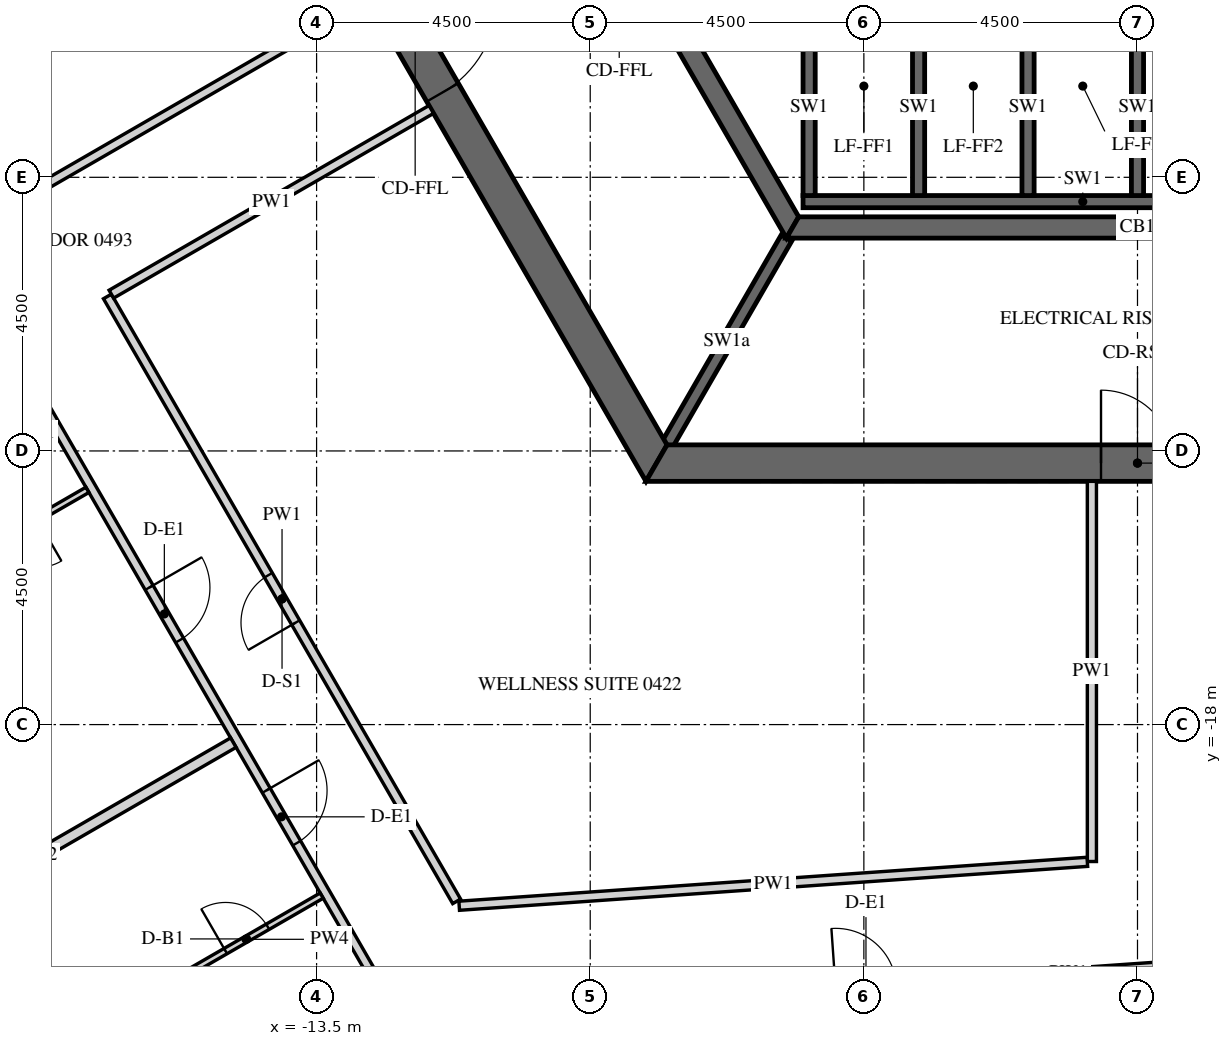
"""IFC4 building model, lengths in metres.
Left out: names, types, materials, properties, quantities, classifications, styles, units other than length and angle.
Written with IfcOpenShell. Run it as: python <this file> out.ifc"""

import sys

from ifc_helpers import new_model, si_unit, direction, frame, frame_2d, origin, place, context, subcontext, project, spatial, polyline, rectangle, outline, extrude, element, fill, save


model = new_model("IFC4")
c1 = context("Model", 3, precision=1e-05, world=origin(), true_north=direction((0.0, 1.0)))
c2 = subcontext(c1, "Body", "Model", "MODEL_VIEW")
j1 = project(units=[si_unit("LENGTHUNIT", "METRE"), si_unit("PLANEANGLEUNIT", "RADIAN")], contexts=[c1])
p1 = place(None, origin())
s1 = spatial("IfcSite", under=j1, at=p1, CompositionType="ELEMENT")
p2 = place(p1, origin())
s2 = spatial("IfcBuilding", under=s1, at=p2, CompositionType="ELEMENT")
p3 = place(p2, frame((0.0, 0.0, 68.7)))
s3 = spatial("IfcBuildingStorey", under=s2, at=p3, CompositionType="ELEMENT", Elevation=68.7)
p4 = place(p3, frame((-32.655, -2.89, -0.15), z_axis=(0.0, 0.0, 1.0), x_axis=(0.499997711317, -0.866026725152, 0.0)))
e1 = element("IfcWall", 1, at=p4, inside=s3, PredefinedType="SOLIDWALL", context=c2, shape_type="SweptSolid", body=[
    extrude(outline(polyline([(-0.022, -0.275), (30.097, -0.275), (30.045, 0.275), (0.022, 0.275), (-0.022, -0.275)])), origin(), (0.0, 0.0, 1.0), 3.9),
])
p5 = place(p4, frame((1.236, 0.0, 1.05)))
e2 = element("IfcOpeningElement", 2, at=p5, cuts=e1, PredefinedType="OPENING", context=c2, shape_type="SweptSolid", body=[
    extrude(rectangle(XDim=2.4, YDim=2.4, at=frame_2d((1.2, 1.2))), frame((0.0, 0.285, 0.0), z_axis=(0.0, -1.0, 0.0), x_axis=(1.0, 0.0, 0.0)), (0.0, 0.0, 1.0), 0.57),
])
p6 = place(p4, frame((4.835, 0.0, 1.05)))
e3 = element("IfcOpeningElement", 3, at=p6, cuts=e1, PredefinedType="OPENING", context=c2, shape_type="SweptSolid", body=[
    extrude(rectangle(XDim=2.4, YDim=2.4, at=frame_2d((1.2, 1.2))), frame((0.0, 0.285, 0.0), z_axis=(0.0, -1.0, 0.0), x_axis=(1.0, 0.0, 0.0)), (0.0, 0.0, 1.0), 0.57),
])
p7 = place(p4, frame((8.436, 0.0, 1.05)))
e4 = element("IfcOpeningElement", 4, at=p7, cuts=e1, PredefinedType="OPENING", context=c2, shape_type="SweptSolid", body=[
    extrude(rectangle(XDim=2.4, YDim=2.4, at=frame_2d((1.2, 1.2))), frame((0.0, 0.285, 0.0), z_axis=(0.0, -1.0, 0.0), x_axis=(1.0, 0.0, 0.0)), (0.0, 0.0, 1.0), 0.57),
])
p8 = place(p4, frame((12.035, 0.0, 1.05)))
e5 = element("IfcOpeningElement", 5, at=p8, cuts=e1, PredefinedType="OPENING", context=c2, shape_type="SweptSolid", body=[
    extrude(rectangle(XDim=2.4, YDim=2.4, at=frame_2d((1.2, 1.2))), frame((0.0, 0.285, 0.0), z_axis=(0.0, -1.0, 0.0), x_axis=(1.0, 0.0, 0.0)), (0.0, 0.0, 1.0), 0.57),
])
p9 = place(p4, frame((15.635, 0.0, 1.05)))
e6 = element("IfcOpeningElement", 6, at=p9, cuts=e1, PredefinedType="OPENING", context=c2, shape_type="SweptSolid", body=[
    extrude(rectangle(XDim=2.4, YDim=2.4, at=frame_2d((1.2, 1.2))), frame((0.0, 0.285, 0.0), z_axis=(0.0, -1.0, 0.0), x_axis=(1.0, 0.0, 0.0)), (0.0, 0.0, 1.0), 0.57),
])
p10 = place(p4, frame((19.236, 0.0, 1.05)))
e7 = element("IfcOpeningElement", 7, at=p10, cuts=e1, PredefinedType="OPENING", context=c2, shape_type="SweptSolid", body=[
    extrude(rectangle(XDim=2.4, YDim=2.4, at=frame_2d((1.2, 1.2))), frame((0.0, 0.285, 0.0), z_axis=(0.0, -1.0, 0.0), x_axis=(1.0, 0.0, 0.0)), (0.0, 0.0, 1.0), 0.57),
])
p11 = place(p4, frame((22.835, 0.0, 1.05)))
e8 = element("IfcOpeningElement", 8, at=p11, cuts=e1, PredefinedType="OPENING", context=c2, shape_type="SweptSolid", body=[
    extrude(rectangle(XDim=2.4, YDim=2.4, at=frame_2d((1.2, 1.2))), frame((0.0, 0.285, 0.0), z_axis=(0.0, -1.0, 0.0), x_axis=(1.0, 0.0, 0.0)), (0.0, 0.0, 1.0), 0.57),
])
p12 = place(p4, frame((26.436, 0.0, 1.05)))
e9 = element("IfcOpeningElement", 9, at=p12, cuts=e1, PredefinedType="OPENING", context=c2, shape_type="SweptSolid", body=[
    extrude(rectangle(XDim=2.4, YDim=2.4, at=frame_2d((1.2, 1.2))), frame((0.0, 0.285, 0.0), z_axis=(0.0, -1.0, 0.0), x_axis=(1.0, 0.0, 0.0)), (0.0, 0.0, 1.0), 0.57),
])
p13 = place(p3, frame((-15.819, 0.0, -0.15), z_axis=(0.0, 0.0, 1.0), x_axis=(0.499999880136, -0.866025472988, 0.0)))
e10 = element("IfcWall", 10, at=p13, inside=s3, PredefinedType="SHEAR", context=c2, shape_type="SweptSolid", body=[
    extrude(outline(polyline([(-0.173, -0.3), (15.993, -0.3), (15.646, 0.3), (0.173, 0.3), (-0.173, -0.3)])), origin(), (0.0, 0.0, 1.0), 3.9),
])
p14 = place(p13, frame((6.981, 0.0, 0.15)))
e11 = element("IfcOpeningElement", 11, at=p14, cuts=e10, PredefinedType="OPENING", context=c2, shape_type="SweptSolid", body=[
    extrude(rectangle(XDim=1.8, YDim=2.4, at=frame_2d((0.9, 1.2))), frame((0.0, 0.31, 0.0), z_axis=(0.0, -1.0, 0.0), x_axis=(1.0, 0.0, 0.0)), (0.0, 0.0, 1.0), 0.62),
])
p15 = place(p3, frame((-7.91, -13.7, -0.15), z_axis=(0.0, 0.0, 1.0), x_axis=(1.0, 0.0, 0.0)))
e12 = element("IfcWall", 12, at=p15, inside=s3, PredefinedType="SHEAR", context=c2, shape_type="SweptSolid", body=[
    extrude(outline(polyline([(-0.173, -0.3), (15.993, -0.3), (15.646, 0.3), (0.173, 0.3), (-0.173, -0.3)])), origin(), (0.0, 0.0, 1.0), 3.9),
])
p16 = place(p15, frame((7.31, 0.0, 0.15)))
e13 = element("IfcOpeningElement", 13, at=p16, cuts=e12, PredefinedType="OPENING", context=c2, shape_type="SweptSolid", body=[
    extrude(rectangle(XDim=1.2, YDim=2.4, at=frame_2d((0.6, 1.2))), frame((0.0, 0.31, 0.0), z_axis=(0.0, -1.0, 0.0), x_axis=(1.0, 0.0, 0.0)), (0.0, 0.0, 1.0), 0.62),
])
p17 = place(p3, frame((-11.345, 0.0, -0.15), z_axis=(0.0, 0.0, 1.0), x_axis=(0.499995046907, -0.866028263435, 0.0)))
e14 = element("IfcWall", 14, at=p17, inside=s3, PredefinedType="SHEAR", context=c2, shape_type="SweptSolid", body=[
    extrude(outline(polyline([(-0.101, -0.175), (11.446, -0.175), (11.244, 0.175), (0.101, 0.175), (-0.101, -0.175)])), origin(), (0.0, 0.0, 1.0), 3.9),
])
p18 = place(p17, frame((4.744, 0.0, 0.15)))
e15 = element("IfcOpeningElement", 15, at=p18, cuts=e14, PredefinedType="OPENING", context=c2, shape_type="SweptSolid", body=[
    extrude(rectangle(XDim=1.8, YDim=2.4, at=frame_2d((0.9, 1.2))), frame((0.0, 0.185, 0.0), z_axis=(0.0, -1.0, 0.0), x_axis=(1.0, 0.0, 0.0)), (0.0, 0.0, 1.0), 0.37),
])
p19 = place(p3, frame((-5.673, -9.825, -0.15), z_axis=(0.0, 0.0, 1.0), x_axis=(1.0, 0.0, 0.0)))
e16 = element("IfcWall", 16, at=p19, inside=s3, PredefinedType="SHEAR", context=c2, shape_type="SweptSolid", body=[
    extrude(outline(polyline([(-0.101, -0.175), (11.446, -0.175), (11.244, 0.175), (0.101, 0.175), (-0.101, -0.175)])), origin(), (0.0, 0.0, 1.0), 3.9),
])
p20 = place(p3, frame((-5.5, -9.4, -0.25), z_axis=(0.0, 0.0, 1.0), x_axis=(1.0, 0.0, 0.0)))
e17 = element("IfcWall", 17, at=p20, inside=s3, PredefinedType="SHEAR", context=c2, shape_type="SweptSolid", body=[
    extrude(rectangle(XDim=9.2, YDim=0.2, at=frame_2d((4.6, 0.0))), origin(), (0.0, 0.0, 1.0), 3.9),
])
for number, where, z_axis, x_axis in (
    (18, (-5.4, -9.3, -0.25), (0.0, 0.0, 1.0), (0.0, 1.0, 0.0)),
    (19, (-3.6, -9.3, -0.25), (0.0, 0.0, 1.0), (0.0, 1.0, 0.0)),
    (20, (-1.8, -9.3, -0.25), (0.0, 0.0, 1.0), (0.0, 1.0, 0.0)),
    (21, (0.0, -9.3, -0.25), (0.0, 0.0, 1.0), (0.0, 1.0, 0.0)),
):
    element("IfcWall", number, at=place(p3, frame(where, z_axis=z_axis, x_axis=x_axis)), inside=s3, PredefinedType="SHEAR", context=c2, shape_type="SweptSolid", body=[
        extrude(rectangle(XDim=2.9, YDim=0.2, at=frame_2d((1.45, 0.0))), origin(), (0.0, 0.0, 1.0), 3.9),
    ])
p21 = place(p3, frame((-5.773, -10.0, -0.15), z_axis=(0.0, 0.0, 1.0), x_axis=(-0.500038251005, -0.86600331843, 0.0)))
e22 = element("IfcWall", 22, at=p21, inside=s3, PredefinedType="SHEAR", context=c2, shape_type="SweptSolid", body=[
    extrude(rectangle(XDim=3.926, YDim=0.2, at=frame_2d((1.963, 0.0))), origin(), (0.0, 0.0, 1.0), 3.9),
])
p22 = place(p3, frame((-24.09, -2.175, 0.0), z_axis=(0.0, 0.0, 1.0), x_axis=(0.499996832073, -0.86602723278, 0.0)))
e23 = element("IfcWall", 23, at=p22, inside=s3, PredefinedType="PARTITIONING", context=c2, shape_type="SweptSolid", body=[
    extrude(rectangle(XDim=23.877, YDim=0.15, at=frame_2d((11.938, 0.0))), origin(), (0.0, 0.0, 1.0), 2.988),
])
p23 = place(p22, frame((3.943, 0.0, 0.0)))
e24 = element("IfcOpeningElement", 24, at=p23, cuts=e23, PredefinedType="OPENING", context=c2, shape_type="SweptSolid", body=[
    extrude(rectangle(XDim=1.0, YDim=2.1, at=frame_2d((0.5, 1.05))), frame((0.0, 0.085, 0.0), z_axis=(0.0, -1.0, 0.0), x_axis=(1.0, 0.0, 0.0)), (0.0, 0.0, 1.0), 0.17),
])
p24 = place(p22, frame((15.672, 0.0, 0.0)))
e25 = element("IfcOpeningElement", 25, at=p24, cuts=e23, PredefinedType="OPENING", context=c2, shape_type="SweptSolid", body=[
    extrude(rectangle(XDim=1.0, YDim=2.1, at=frame_2d((0.5, 1.05))), frame((0.0, 0.085, 0.0), z_axis=(0.0, -1.0, 0.0), x_axis=(1.0, 0.0, 0.0)), (0.0, 0.0, 1.0), 0.17),
])
p25 = place(p22, frame((19.525, 0.0, 0.0)))
e26 = element("IfcOpeningElement", 26, at=p25, cuts=e23, PredefinedType="OPENING", context=c2, shape_type="SweptSolid", body=[
    extrude(rectangle(XDim=1.0, YDim=2.1, at=frame_2d((0.5, 1.05))), frame((0.0, 0.085, 0.0), z_axis=(0.0, -1.0, 0.0), x_axis=(1.0, 0.0, 0.0)), (0.0, 0.0, 1.0), 0.17),
])
p26 = place(p3, frame((-12.151, -22.853, 0.0), z_axis=(0.0, 0.0, 1.0), x_axis=(0.99756425444, 0.069753553767, 0.0)))
e27 = element("IfcWall", 27, at=p26, inside=s3, PredefinedType="PARTITIONING", context=c2, shape_type="SweptSolid", body=[
    extrude(rectangle(XDim=22.085, YDim=0.15, at=frame_2d((11.042, 0.0))), origin(), (0.0, 0.0, 1.0), 2.988),
])
p27 = place(p26, frame((7.205, 0.0, 0.0)))
e28 = element("IfcOpeningElement", 28, at=p27, cuts=e27, PredefinedType="OPENING", context=c2, shape_type="SweptSolid", body=[
    extrude(rectangle(XDim=1.0, YDim=2.1, at=frame_2d((0.5, 1.05))), frame((0.0, 0.085, 0.0), z_axis=(0.0, -1.0, 0.0), x_axis=(1.0, 0.0, 0.0)), (0.0, 0.0, 1.0), 0.17),
])
p28 = place(p26, frame((17.995, 0.0, 0.0)))
e29 = element("IfcOpeningElement", 29, at=p28, cuts=e27, PredefinedType="OPENING", context=c2, shape_type="SweptSolid", body=[
    extrude(rectangle(XDim=1.0, YDim=2.1, at=frame_2d((0.5, 1.05))), frame((0.0, 0.085, 0.0), z_axis=(0.0, -1.0, 0.0), x_axis=(1.0, 0.0, 0.0)), (0.0, 0.0, 1.0), 0.17),
])
p29 = place(p3, frame((-12.664, -6.066, 0.0), z_axis=(0.0, 0.0, 1.0), x_axis=(-0.866023618125, -0.500003092839, 0.0)))
e30 = element("IfcWall", 30, at=p29, inside=s3, PredefinedType="PARTITIONING", context=c2, shape_type="SweptSolid", body=[
    extrude(rectangle(XDim=6.15, YDim=0.15, at=frame_2d((3.075, 0.0))), origin(), (0.0, 0.0, 1.0), 2.988),
])
p30 = place(p3, frame((-0.75, -14.0, 0.0), z_axis=(0.0, 0.0, 1.0), x_axis=(0.0, -1.0, 0.0)))
e31 = element("IfcWall", 31, at=p30, inside=s3, PredefinedType="PARTITIONING", context=c2, shape_type="SweptSolid", body=[
    extrude(rectangle(XDim=6.252, YDim=0.15, at=frame_2d((3.126, 0.0))), origin(), (0.0, 0.0, 1.0), 2.988),
])
p31 = place(p3, frame((-0.825, -20.257, 0.0), z_axis=(0.0, 0.0, 1.0), x_axis=(-0.9975635143, -0.069764137903, 0.0)))
e32 = element("IfcWall", 32, at=p31, inside=s3, PredefinedType="PARTITIONING", context=c2, shape_type="SweptSolid", body=[
    extrude(rectangle(XDim=10.355, YDim=0.15, at=frame_2d((5.177, 0.0))), origin(), (0.0, 0.0, 1.0), 2.988),
])
p32 = place(p3, frame((-11.197, -20.907, 0.0), z_axis=(0.0, 0.0, 1.0), x_axis=(-0.500004557924, 0.86602277225, 0.0)))
e33 = element("IfcWall", 33, at=p32, inside=s3, PredefinedType="PARTITIONING", context=c2, shape_type="SweptSolid", body=[
    extrude(rectangle(XDim=11.487, YDim=0.15, at=frame_2d((5.743, 0.0))), origin(), (0.0, 0.0, 1.0), 2.988),
])
p33 = place(p32, frame((5.293, 0.0, 0.0)))
e34 = element("IfcOpeningElement", 34, at=p33, cuts=e33, PredefinedType="OPENING", context=c2, shape_type="SweptSolid", body=[
    extrude(rectangle(XDim=0.9, YDim=2.1, at=frame_2d((0.45, 1.05))), frame((0.0, 0.085, 0.0), z_axis=(0.0, -1.0, 0.0), x_axis=(1.0, 0.0, 0.0)), (0.0, 0.0, 1.0), 0.17),
])
p34 = place(p3, frame((-16.875, -10.922, 0.0), z_axis=(0.0, 0.0, 1.0), x_axis=(0.866023634079, 0.500003065207, 0.0)))
e35 = element("IfcWall", 35, at=p34, inside=s3, PredefinedType="PARTITIONING", context=c2, shape_type="SweptSolid", body=[
    extrude(rectangle(XDim=6.075, YDim=0.15, at=frame_2d((3.038, 0.0))), origin(), (0.0, 0.0, 1.0), 2.988),
])
p35 = place(p3, frame((-17.269, -14.14, 0.0), z_axis=(0.0, 0.0, 1.0), x_axis=(-0.865973021571, -0.500090717682, 0.0)))
e36 = element("IfcWall", 36, at=p35, inside=s3, PredefinedType="PARTITIONING", context=c2, shape_type="SweptSolid", body=[
    extrude(rectangle(XDim=2.525, YDim=0.1, at=frame_2d((1.262, 0.0))), origin(), (0.0, 0.0, 1.0), 2.988),
])
p36 = place(p35, frame((0.955, 0.0, 0.0)))
e37 = element("IfcOpeningElement", 37, at=p36, cuts=e36, PredefinedType="OPENING", context=c2, shape_type="SweptSolid", body=[
    extrude(rectangle(XDim=0.8, YDim=2.1, at=frame_2d((0.4, 1.05))), frame((0.0, 0.06, 0.0), z_axis=(0.0, -1.0, 0.0), x_axis=(1.0, 0.0, 0.0)), (0.0, 0.0, 1.0), 0.12),
])
p37 = place(p3, frame((-21.299, -22.009, 0.0), z_axis=(0.0, 0.0, 1.0), x_axis=(0.866014745021, 0.500018461065, 0.0)))
e38 = element("IfcWall", 38, at=p37, inside=s3, PredefinedType="PARTITIONING", context=c2, shape_type="SweptSolid", body=[
    extrude(rectangle(XDim=7.425, YDim=0.18, at=frame_2d((3.712, 0.0))), origin(), (0.0, 0.0, 1.0), 2.988),
])
p38 = place(p3, frame((-15.906, -22.25, 0.0), z_axis=(0.0, 0.0, 1.0), x_axis=(0.866018712932, 0.500011588718, 0.0)))
e39 = element("IfcWall", 39, at=p38, inside=s3, PredefinedType="PARTITIONING", context=c2, shape_type="SweptSolid", body=[
    extrude(rectangle(XDim=2.875, YDim=0.1, at=frame_2d((1.438, 0.0))), origin(), (0.0, 0.0, 1.0), 2.988),
])
p39 = place(p38, frame((1.05, 0.0, 0.0)))
e40 = element("IfcOpeningElement", 40, at=p39, cuts=e39, PredefinedType="OPENING", context=c2, shape_type="SweptSolid", body=[
    extrude(rectangle(XDim=0.8, YDim=2.1, at=frame_2d((0.4, 1.05))), frame((0.0, 0.06, 0.0), z_axis=(0.0, -1.0, 0.0), x_axis=(1.0, 0.0, 0.0)), (0.0, 0.0, 1.0), 0.12),
])
p40 = place(p14, origin())
e41 = element("IfcDoor", 41, at=p40, inside=s3, OperationType="DOUBLE_DOOR_SINGLE_SWING", PredefinedType="DOOR", context=c2, shape_type="SweptSolid", body=[
    extrude(rectangle(XDim=1.8, YDim=2.4, at=frame_2d((0.9, 1.2))), frame((0.0, 0.025, 0.0), z_axis=(0.0, -1.0, 0.0), x_axis=(1.0, 0.0, 0.0)), (0.0, 0.0, 1.0), 0.05),
])
fill(e11, e41)
p41 = place(p16, origin())
e42 = element("IfcDoor", 42, at=p41, inside=s3, OperationType="SINGLE_SWING_LEFT", PredefinedType="DOOR", context=c2, shape_type="SweptSolid", body=[
    extrude(rectangle(XDim=1.2, YDim=2.4, at=frame_2d((0.6, 1.2))), frame((0.0, 0.025, 0.0), z_axis=(0.0, -1.0, 0.0), x_axis=(1.0, 0.0, 0.0)), (0.0, 0.0, 1.0), 0.05),
])
fill(e13, e42)
p42 = place(p24, origin())
e43 = element("IfcDoor", 43, at=p42, inside=s3, OperationType="SINGLE_SWING_RIGHT", PredefinedType="DOOR", context=c2, shape_type="SweptSolid", body=[
    extrude(rectangle(XDim=1.0, YDim=2.1, at=frame_2d((0.5, 1.05))), frame((0.0, 0.025, 0.0), z_axis=(0.0, -1.0, 0.0), x_axis=(1.0, 0.0, 0.0)), (0.0, 0.0, 1.0), 0.05),
])
fill(e25, e43)
p43 = place(p25, origin())
e44 = element("IfcDoor", 44, at=p43, inside=s3, OperationType="SINGLE_SWING_RIGHT", PredefinedType="DOOR", context=c2, shape_type="SweptSolid", body=[
    extrude(rectangle(XDim=1.0, YDim=2.1, at=frame_2d((0.5, 1.05))), frame((0.0, 0.025, 0.0), z_axis=(0.0, -1.0, 0.0), x_axis=(1.0, 0.0, 0.0)), (0.0, 0.0, 1.0), 0.05),
])
fill(e26, e44)
p44 = place(p39, origin())
e45 = element("IfcDoor", 45, at=p44, inside=s3, OperationType="SINGLE_SWING_LEFT", PredefinedType="DOOR", context=c2, shape_type="SweptSolid", body=[
    extrude(rectangle(XDim=0.8, YDim=2.1, at=frame_2d((0.4, 1.05))), frame((0.0, 0.025, 0.0), z_axis=(0.0, -1.0, 0.0), x_axis=(1.0, 0.0, 0.0)), (0.0, 0.0, 1.0), 0.05),
])
fill(e40, e45)
p45 = place(p33, origin())
e46 = element("IfcDoor", 46, at=p45, inside=s3, OperationType="SINGLE_SWING_RIGHT", PredefinedType="DOOR", context=c2, shape_type="SweptSolid", body=[
    extrude(rectangle(XDim=0.9, YDim=2.1, at=frame_2d((0.45, 1.05))), frame((0.0, 0.025, 0.0), z_axis=(0.0, -1.0, 0.0), x_axis=(1.0, 0.0, 0.0)), (0.0, 0.0, 1.0), 0.05),
])
fill(e34, e46)
save(model, sys.argv[1])
